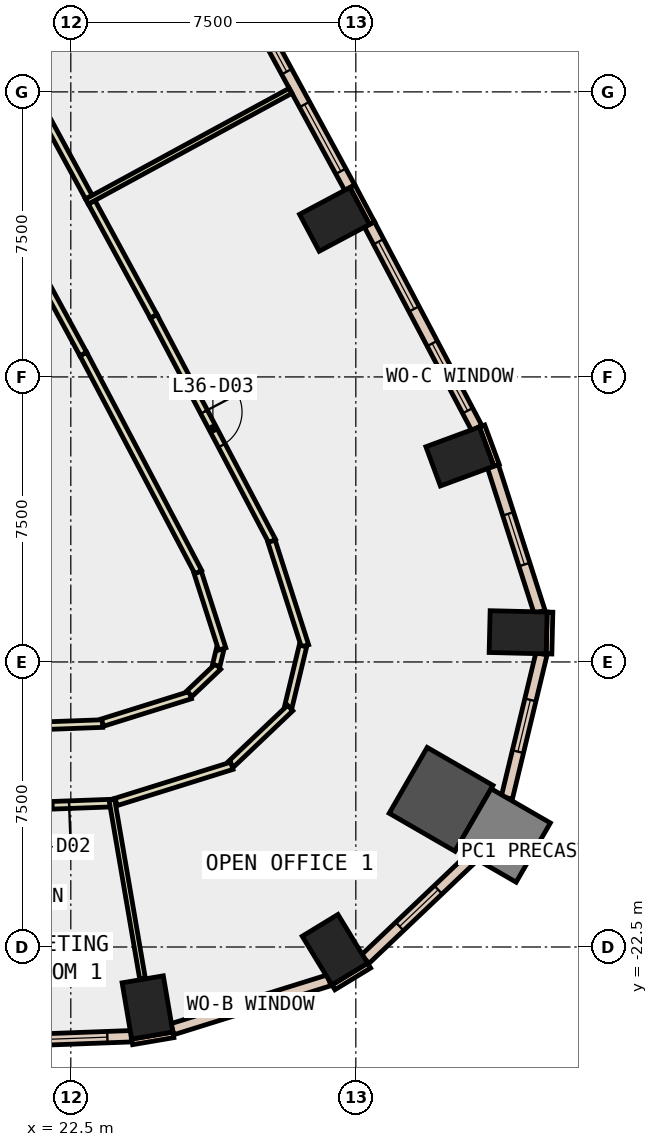
"""IFC4 building model, lengths in metres.
Left out: names, types, materials, properties, quantities, classifications, styles, units other than length and angle.
Written with IfcOpenShell. Run it as: python <this file> out.ifc"""

import sys

from ifc_helpers import new_model, si_unit, direction, frame, frame_2d, origin, origin_2d, place, context, subcontext, project, spatial, rectangle, extrude, element, fill, save


model = new_model("IFC4")
c1 = context("Model", 3, precision=1e-05, world=origin(), true_north=direction((0.0, 1.0)))
c2 = subcontext(c1, "Body", "Model", "MODEL_VIEW")
j1 = project(units=[si_unit("LENGTHUNIT", "METRE"), si_unit("PLANEANGLEUNIT", "RADIAN")], contexts=[c1])
p1 = place(None, origin())
s1 = spatial("IfcSite", under=j1, at=p1, CompositionType="ELEMENT")
p2 = place(p1, origin())
s2 = spatial("IfcBuilding", under=s1, at=p2, CompositionType="ELEMENT")
p3 = place(p2, frame((0.0, 0.0, 163.4)))
s3 = spatial("IfcBuildingStorey", under=s2, at=p3, CompositionType="ELEMENT", Elevation=163.4)
for number, where, z_axis, x_axis in (
    (1, (24.518, -24.09, -0.4), (0.0, 0.0, 1.0), (0.986, 0.168, 0.0)),
    (2, (29.45, -22.571, -0.4), (0.0, 0.0, 1.0), (0.854, 0.521, 0.0)),
):
    element("IfcColumn", number, at=place(p3, frame(where, z_axis=z_axis, x_axis=x_axis)), inside=s3, PredefinedType="COLUMN", context=c2, shape_type="SweptSolid", body=[
        extrude(rectangle(XDim=1.1, YDim=1.5, at=origin_2d()), origin(), (0.0, 0.0, 1.0), 4.2),
    ])
p4 = place(p3, frame((32.244, -18.615, -0.4), z_axis=(0.0, 0.0, 1.0), x_axis=(-0.866025403784, 0.5, 0.0)))
e3 = element("IfcColumn", 3, at=p4, inside=s3, PredefinedType="COLUMN", context=c2, shape_type="SweptSolid", body=[
    extrude(rectangle(XDim=2.0, YDim=2.0, at=origin_2d()), origin(), (0.0, 0.0, 1.0), 4.2),
])
for number, where, z_axis, x_axis in (
    (4, (34.271, -14.219, -0.4), (0.0, 0.0, 1.0), (0.024, 1.0, 0.0)),
    (5, (32.738, -9.593, -0.4), (0.0, 0.0, 1.0), (-0.347, 0.938, 0.0)),
    (6, (29.44, -3.355, -0.4), (0.0, 0.0, 1.0), (-0.47, 0.883, 0.0)),
):
    element("IfcColumn", number, at=place(p3, frame(where, z_axis=z_axis, x_axis=x_axis)), inside=s3, PredefinedType="COLUMN", context=c2, shape_type="SweptSolid", body=[
        extrude(rectangle(XDim=1.1, YDim=1.5, at=origin_2d()), origin(), (0.0, 0.0, 1.0), 4.2),
    ])
p5 = place(p3, frame((33.889, -19.565, -0.4), z_axis=(0.0, 0.0, 1.0), x_axis=(-0.866025403784, 0.5, 0.0)))
e7 = element("IfcColumn", 7, at=p5, inside=s3, PredefinedType="COLUMN", context=c2, shape_type="SweptSolid", body=[
    extrude(rectangle(XDim=1.8, YDim=1.8, at=origin_2d()), origin(), (0.0, 0.0, 1.0), 4.2),
])
for number, where, z_axis, x_axis in (
    (8, (33.702, -9.823, 0.0), (0.0, 0.0, 1.0), (-0.346, 0.938, 0.0)),
    (9, (30.426, -3.453, 0.0), (0.0, 0.0, 1.0), (-0.47, 0.883, 0.0)),
):
    element("IfcWall", number, at=place(p3, frame(where, z_axis=z_axis, x_axis=x_axis)), inside=s3, PredefinedType="STANDARD", context=c2, shape_type="SweptSolid", body=[
        extrude(rectangle(XDim=1.1, YDim=0.15, at=frame_2d((0.55, 0.0))), origin(), (0.0, 0.0, 1.0), 3.8),
    ])
p6 = place(p3, frame((24.114, -24.996, 0.0), z_axis=(0.0, 0.0, 1.0), x_axis=(0.985763338892, 0.168138751323, 0.0)))
e10 = element("IfcWall", 10, at=p6, inside=s3, PredefinedType="STANDARD", context=c2, shape_type="SweptSolid", body=[
    extrude(rectangle(XDim=1.101, YDim=0.15, at=frame_2d((0.55, 0.0))), origin(), (0.0, 0.0, 1.0), 3.8),
])
p7 = place(p3, frame((29.41, -23.561, 0.0), z_axis=(0.0, 0.0, 1.0), x_axis=(0.854065628997, 0.520165263514, 0.0)))
e11 = element("IfcWall", 11, at=p7, inside=s3, PredefinedType="STANDARD", context=c2, shape_type="SweptSolid", body=[
    extrude(rectangle(XDim=1.1, YDim=0.15, at=frame_2d((0.55, 0.0))), origin(), (0.0, 0.0, 1.0), 3.8),
])
p8 = place(p3, frame((35.083, -14.789, 0.0), z_axis=(0.0, 0.0, 1.0), x_axis=(0.023517683673, 0.999723421029, 0.0)))
e12 = element("IfcWall", 12, at=p8, inside=s3, PredefinedType="STANDARD", context=c2, shape_type="SweptSolid", body=[
    extrude(rectangle(XDim=1.1, YDim=0.15, at=frame_2d((0.55, 0.0))), origin(), (0.0, 0.0, 1.0), 3.8),
])
p9 = place(p3, frame((16.778, -25.12, 0.0), z_axis=(0.0, 0.0, 1.0), x_axis=(0.999307730926, 0.037202942236, 0.0)))
e13 = element("IfcWall", 13, at=p9, inside=s3, PredefinedType="STANDARD", context=c2, shape_type="SweptSolid", body=[
    extrude(rectangle(XDim=7.317, YDim=0.3, at=frame_2d((3.659, 0.0))), origin(), (0.0, 0.0, 1.0), 3.8),
])
p10 = place(p9, frame((0.629, 0.0, 0.9)))
e14 = element("IfcOpeningElement", 14, at=p10, cuts=e13, PredefinedType="OPENING", context=c2, shape_type="SweptSolid", body=[
    extrude(rectangle(XDim=2.4, YDim=2.6, at=frame_2d((1.2, 1.3))), frame((0.0, 0.16, 0.0), z_axis=(0.0, -1.0, 0.0), x_axis=(1.0, 0.0, 0.0)), (0.0, 0.0, 1.0), 0.32),
])
p11 = place(p9, frame((4.288, 0.0, 0.9)))
e15 = element("IfcOpeningElement", 15, at=p11, cuts=e13, PredefinedType="OPENING", context=c2, shape_type="SweptSolid", body=[
    extrude(rectangle(XDim=2.4, YDim=2.6, at=frame_2d((1.2, 1.3))), frame((0.0, 0.16, 0.0), z_axis=(0.0, -1.0, 0.0), x_axis=(1.0, 0.0, 0.0)), (0.0, 0.0, 1.0), 0.32),
])
p12 = place(p3, frame((25.172, -24.663, 0.0), z_axis=(0.0, 0.0, 1.0), x_axis=(0.954628614874, 0.29779893832, 0.0)))
e16 = element("IfcWall", 16, at=p12, inside=s3, PredefinedType="STANDARD", context=c2, shape_type="SweptSolid", body=[
    extrude(rectangle(XDim=4.322, YDim=0.3, at=frame_2d((2.161, 0.0))), origin(), (0.0, 0.0, 1.0), 3.8),
])
p13 = place(p12, frame((1.461, 0.0, 0.9)))
e17 = element("IfcOpeningElement", 17, at=p13, cuts=e16, PredefinedType="OPENING", context=c2, shape_type="SweptSolid", body=[
    extrude(rectangle(XDim=1.4, YDim=2.6, at=frame_2d((0.7, 1.3))), frame((0.0, 0.16, 0.0), z_axis=(0.0, -1.0, 0.0), x_axis=(1.0, 0.0, 0.0)), (0.0, 0.0, 1.0), 0.32),
])
p14 = place(p3, frame((30.246, -22.821, 0.0), z_axis=(0.0, 0.0, 1.0), x_axis=(0.724807239831, 0.688951714628, 0.0)))
e18 = element("IfcWall", 18, at=p14, inside=s3, PredefinedType="STANDARD", context=c2, shape_type="SweptSolid", body=[
    extrude(rectangle(XDim=3.902, YDim=0.3, at=frame_2d((1.951, 0.0))), origin(), (0.0, 0.0, 1.0), 3.8),
])
p15 = place(p14, frame((1.251, 0.0, 0.9)))
e19 = element("IfcOpeningElement", 19, at=p15, cuts=e18, PredefinedType="OPENING", context=c2, shape_type="SweptSolid", body=[
    extrude(rectangle(XDim=1.4, YDim=2.6, at=frame_2d((0.7, 1.3))), frame((0.0, 0.16, 0.0), z_axis=(0.0, -1.0, 0.0), x_axis=(1.0, 0.0, 0.0)), (0.0, 0.0, 1.0), 0.32),
])
p16 = place(p3, frame((33.973, -18.575, 0.0), z_axis=(0.0, 0.0, 1.0), x_axis=(0.234102046927, 0.972212030179, 0.0)))
e20 = element("IfcWall", 20, at=p16, inside=s3, PredefinedType="STANDARD", context=c2, shape_type="SweptSolid", body=[
    extrude(rectangle(XDim=3.9, YDim=0.3, at=frame_2d((1.95, 0.0))), origin(), (0.0, 0.0, 1.0), 3.8),
])
p17 = place(p16, frame((1.25, 0.0, 0.9)))
e21 = element("IfcOpeningElement", 21, at=p17, cuts=e20, PredefinedType="OPENING", context=c2, shape_type="SweptSolid", body=[
    extrude(rectangle(XDim=1.4, YDim=2.6, at=frame_2d((0.7, 1.3))), frame((0.0, 0.16, 0.0), z_axis=(0.0, -1.0, 0.0), x_axis=(1.0, 0.0, 0.0)), (0.0, 0.0, 1.0), 0.32),
])
p18 = place(p3, frame((34.835, -13.684, 0.0), z_axis=(0.0, 0.0, 1.0), x_axis=(-0.305018133869, 0.952346543025, 0.0)))
e22 = element("IfcWall", 22, at=p18, inside=s3, PredefinedType="STANDARD", context=c2, shape_type="SweptSolid", body=[
    extrude(rectangle(XDim=4.02, YDim=0.3, at=frame_2d((2.01, 0.0))), origin(), (0.0, 0.0, 1.0), 3.8),
])
p19 = place(p18, frame((1.31, 0.0, 0.9)))
e23 = element("IfcOpeningElement", 23, at=p19, cuts=e22, PredefinedType="OPENING", context=c2, shape_type="SweptSolid", body=[
    extrude(rectangle(XDim=1.4, YDim=2.6, at=frame_2d((0.7, 1.3))), frame((0.0, 0.16, 0.0), z_axis=(0.0, -1.0, 0.0), x_axis=(1.0, 0.0, 0.0)), (0.0, 0.0, 1.0), 0.32),
])
p20 = place(p3, frame((33.182, -8.844, 0.0), z_axis=(0.0, 0.0, 1.0), x_axis=(-0.466399410196, 0.884574242316, 0.0)))
e24 = element("IfcWall", 24, at=p20, inside=s3, PredefinedType="STANDARD", context=c2, shape_type="SweptSolid", body=[
    extrude(rectangle(XDim=6.055, YDim=0.3, at=frame_2d((3.027, 0.0))), origin(), (0.0, 0.0, 1.0), 3.8),
])
p21 = place(p20, frame((0.514, 0.0, 0.9)))
e25 = element("IfcOpeningElement", 25, at=p21, cuts=e24, PredefinedType="OPENING", context=c2, shape_type="SweptSolid", body=[
    extrude(rectangle(XDim=2.0, YDim=2.6, at=frame_2d((1.0, 1.3))), frame((0.0, 0.16, 0.0), z_axis=(0.0, -1.0, 0.0), x_axis=(1.0, 0.0, 0.0)), (0.0, 0.0, 1.0), 0.32),
])
p22 = place(p20, frame((3.541, 0.0, 0.9)))
e26 = element("IfcOpeningElement", 26, at=p22, cuts=e24, PredefinedType="OPENING", context=c2, shape_type="SweptSolid", body=[
    extrude(rectangle(XDim=2.0, YDim=2.6, at=frame_2d((1.0, 1.3))), frame((0.0, 0.16, 0.0), z_axis=(0.0, -1.0, 0.0), x_axis=(1.0, 0.0, 0.0)), (0.0, 0.0, 1.0), 0.32),
])
p23 = place(p3, frame((29.839, -2.52, 0.0), z_axis=(0.0, 0.0, 1.0), x_axis=(-0.477555226268, 0.878601733361, 0.0)))
e27 = element("IfcWall", 27, at=p23, inside=s3, PredefinedType="STANDARD", context=c2, shape_type="SweptSolid", body=[
    extrude(rectangle(XDim=5.964, YDim=0.3, at=frame_2d((2.982, 0.0))), origin(), (0.0, 0.0, 1.0), 3.8),
])
p24 = place(p23, frame((0.491, 0.0, 0.9)))
e28 = element("IfcOpeningElement", 28, at=p24, cuts=e27, PredefinedType="OPENING", context=c2, shape_type="SweptSolid", body=[
    extrude(rectangle(XDim=2.0, YDim=2.6, at=frame_2d((1.0, 1.3))), frame((0.0, 0.16, 0.0), z_axis=(0.0, -1.0, 0.0), x_axis=(1.0, 0.0, 0.0)), (0.0, 0.0, 1.0), 0.32),
])
p25 = place(p23, frame((3.473, 0.0, 0.9)))
e29 = element("IfcOpeningElement", 29, at=p25, cuts=e27, PredefinedType="OPENING", context=c2, shape_type="SweptSolid", body=[
    extrude(rectangle(XDim=2.0, YDim=2.6, at=frame_2d((1.0, 1.3))), frame((0.0, 0.16, 0.0), z_axis=(0.0, -1.0, 0.0), x_axis=(1.0, 0.0, 0.0)), (0.0, 0.0, 1.0), 0.32),
])
p26 = place(p3, frame((15.987, -16.893, 0.0), z_axis=(0.0, 0.0, 1.0), x_axis=(0.999316060953, 0.036978511606, 0.0)))
e30 = element("IfcWall", 30, at=p26, inside=s3, PredefinedType="PARTITIONING", context=c2, shape_type="SweptSolid", body=[
    extrude(rectangle(XDim=7.355, YDim=0.2, at=frame_2d((3.677, 0.0))), origin(), (0.0, 0.0, 1.0), 3.8),
])
p27 = place(p3, frame((23.333, -16.595, 0.0), z_axis=(0.0, 0.0, 1.0), x_axis=(0.95454810771, 0.298056890655, 0.0)))
e31 = element("IfcWall", 31, at=p27, inside=s3, PredefinedType="PARTITIONING", context=c2, shape_type="SweptSolid", body=[
    extrude(rectangle(XDim=2.422, YDim=0.2, at=frame_2d((1.211, 0.0))), origin(), (0.0, 0.0, 1.0), 3.8),
])
p28 = place(p3, frame((25.622, -15.834, 0.0), z_axis=(0.0, 0.0, 1.0), x_axis=(0.725069777966, 0.688675407634, 0.0)))
e32 = element("IfcWall", 32, at=p28, inside=s3, PredefinedType="PARTITIONING", context=c2, shape_type="SweptSolid", body=[
    extrude(rectangle(XDim=1.04, YDim=0.2, at=frame_2d((0.52, 0.0))), origin(), (0.0, 0.0, 1.0), 3.8),
])
p29 = place(p3, frame((26.327, -15.089, 0.0), z_axis=(0.0, 0.0, 1.0), x_axis=(0.233414791565, 0.972377259647, 0.0)))
e33 = element("IfcWall", 33, at=p29, inside=s3, PredefinedType="PARTITIONING", context=c2, shape_type="SweptSolid", body=[
    extrude(rectangle(XDim=0.441, YDim=0.2, at=frame_2d((0.221, 0.0))), origin(), (0.0, 0.0, 1.0), 3.8),
])
p30 = place(p3, frame((26.484, -14.658, 0.0), z_axis=(0.0, 0.0, 1.0), x_axis=(-0.305169069368, 0.952298188122, 0.0)))
e34 = element("IfcWall", 34, at=p30, inside=s3, PredefinedType="PARTITIONING", context=c2, shape_type="SweptSolid", body=[
    extrude(rectangle(XDim=2.117, YDim=0.2, at=frame_2d((1.059, 0.0))), origin(), (0.0, 0.0, 1.0), 3.8),
])
p31 = place(p3, frame((25.854, -12.635, 0.0), z_axis=(0.0, 0.0, 1.0), x_axis=(-0.466483047656, 0.884530138689, 0.0)))
e35 = element("IfcWall", 35, at=p31, inside=s3, PredefinedType="PARTITIONING", context=c2, shape_type="SweptSolid", body=[
    extrude(rectangle(XDim=6.487, YDim=0.2, at=frame_2d((3.244, 0.0))), origin(), (0.0, 0.0, 1.0), 3.8),
])
p32 = place(p3, frame((22.828, -6.897, 0.0), z_axis=(0.0, 0.0, 1.0), x_axis=(-0.477513909405, 0.878624189472, 0.0)))
e36 = element("IfcWall", 36, at=p32, inside=s3, PredefinedType="PARTITIONING", context=c2, shape_type="SweptSolid", body=[
    extrude(rectangle(XDim=6.956, YDim=0.2, at=frame_2d((3.478, 0.0))), origin(), (0.0, 0.0, 1.0), 3.8),
])
p33 = place(p3, frame((23.62, -18.712, 0.0), z_axis=(0.0, 0.0, 1.0), x_axis=(-0.999316841287, -0.03695741767, 0.0)))
e37 = element("IfcWall", 37, at=p33, inside=s3, PredefinedType="PARTITIONING", context=c2, shape_type="SweptSolid", body=[
    extrude(rectangle(XDim=3.329, YDim=0.2, at=frame_2d((1.665, 0.0))), origin(), (0.0, 0.0, 1.0), 3.8),
])
p34 = place(p33, frame((1.165, 0.0, 0.0)))
e38 = element("IfcOpeningElement", 38, at=p34, cuts=e37, PredefinedType="OPENING", context=c2, shape_type="SweptSolid", body=[
    extrude(rectangle(XDim=1.0, YDim=2.1, at=frame_2d((0.5, 1.05))), frame((0.0, 0.11, 0.0), z_axis=(0.0, -1.0, 0.0), x_axis=(1.0, 0.0, 0.0)), (0.0, 0.0, 1.0), 0.22),
])
p35 = place(p3, frame((23.048, -2.903, 0.0), z_axis=(0.0, 0.0, 1.0), x_axis=(0.477470161865, -0.878647963936, 0.0)))
e39 = element("IfcWall", 39, at=p35, inside=s3, PredefinedType="PARTITIONING", context=c2, shape_type="SweptSolid", body=[
    extrude(rectangle(XDim=3.418, YDim=0.2, at=frame_2d((1.709, 0.0))), origin(), (0.0, 0.0, 1.0), 3.8),
])
p36 = place(p3, frame((24.68, -5.906, 0.0), z_axis=(0.0, 0.0, 1.0), x_axis=(0.466450727507, -0.884547182918, 0.0)))
e40 = element("IfcWall", 40, at=p36, inside=s3, PredefinedType="PARTITIONING", context=c2, shape_type="SweptSolid", body=[
    extrude(rectangle(XDim=6.685, YDim=0.2, at=frame_2d((3.342, 0.0))), origin(), (0.0, 0.0, 1.0), 3.8),
])
p37 = place(p36, frame((2.842, 0.0, 0.0)))
e41 = element("IfcOpeningElement", 41, at=p37, cuts=e40, PredefinedType="OPENING", context=c2, shape_type="SweptSolid", body=[
    extrude(rectangle(XDim=1.0, YDim=2.1, at=frame_2d((0.5, 1.05))), frame((0.0, 0.11, 0.0), z_axis=(0.0, -1.0, 0.0), x_axis=(1.0, 0.0, 0.0)), (0.0, 0.0, 1.0), 0.22),
])
p38 = place(p3, frame((27.782, -11.825, 0.0), z_axis=(0.0, 0.0, 1.0), x_axis=(0.304925942137, -0.952376065329, 0.0)))
e42 = element("IfcWall", 42, at=p38, inside=s3, PredefinedType="PARTITIONING", context=c2, shape_type="SweptSolid", body=[
    extrude(rectangle(XDim=2.89, YDim=0.2, at=frame_2d((1.445, 0.0))), origin(), (0.0, 0.0, 1.0), 3.8),
])
p39 = place(p3, frame((28.609, -14.579, 0.0), z_axis=(0.0, 0.0, 1.0), x_axis=(-0.233826017197, -0.972278454807, 0.0)))
e43 = element("IfcWall", 43, at=p39, inside=s3, PredefinedType="PARTITIONING", context=c2, shape_type="SweptSolid", body=[
    extrude(rectangle(XDim=1.651, YDim=0.2, at=frame_2d((0.825, 0.0))), origin(), (0.0, 0.0, 1.0), 3.8),
])
p40 = place(p3, frame((28.272, -16.212, 0.0), z_axis=(0.0, 0.0, 1.0), x_axis=(-0.724712974479, -0.689050872303, 0.0)))
e44 = element("IfcWall", 44, at=p40, inside=s3, PredefinedType="PARTITIONING", context=c2, shape_type="SweptSolid", body=[
    extrude(rectangle(XDim=2.15, YDim=0.2, at=frame_2d((1.075, 0.0))), origin(), (0.0, 0.0, 1.0), 3.8),
])
p41 = place(p3, frame((26.737, -17.732, 0.0), z_axis=(0.0, 0.0, 1.0), x_axis=(-0.954546657381, -0.298061535398, 0.0)))
e45 = element("IfcWall", 45, at=p41, inside=s3, PredefinedType="PARTITIONING", context=c2, shape_type="SweptSolid", body=[
    extrude(rectangle(XDim=3.191, YDim=0.2, at=frame_2d((1.596, 0.0))), origin(), (0.0, 0.0, 1.0), 3.8),
])
p42 = place(p3, frame((21.345, 0.23, 0.0), z_axis=(0.0, 0.0, 1.0), x_axis=(0.477544508622, -0.878607558746, 0.0)))
e46 = element("IfcWall", 46, at=p42, inside=s3, PredefinedType="PARTITIONING", context=c2, shape_type="SweptSolid", body=[
    extrude(rectangle(XDim=3.416, YDim=0.2, at=frame_2d((1.708, 0.0))), origin(), (0.0, 0.0, 1.0), 3.8),
])
p43 = place(p3, frame((23.578, -18.614, 0.0), z_axis=(0.0, 0.0, 1.0), x_axis=(0.169054430835, -0.985606716401, 0.0)))
e47 = element("IfcWall", 47, at=p43, inside=s3, PredefinedType="PARTITIONING", context=c2, shape_type="SweptSolid", body=[
    extrude(rectangle(XDim=4.786, YDim=0.15, at=frame_2d((2.393, 0.0))), origin(), (0.0, 0.0, 1.0), 3.8),
])
p44 = place(p3, frame((22.924, -2.885, 0.0), z_axis=(0.0, 0.0, 1.0), x_axis=(0.878512782244, 0.477718841406, 0.0)))
e48 = element("IfcWall", 48, at=p44, inside=s3, PredefinedType="PARTITIONING", context=c2, shape_type="SweptSolid", body=[
    extrude(rectangle(XDim=6.1, YDim=0.15, at=frame_2d((3.05, 0.0))), origin(), (0.0, 0.0, 1.0), 3.8),
])
p45 = place(p11, origin())
e49 = element("IfcWindow", 49, at=p45, inside=s3, PartitioningType="SINGLE_PANEL", PredefinedType="WINDOW", context=c2, shape_type="SweptSolid", body=[
    extrude(rectangle(XDim=2.4, YDim=2.6, at=frame_2d((1.2, 1.3))), frame((0.0, 0.03, 0.0), z_axis=(0.0, -1.0, 0.0), x_axis=(1.0, 0.0, 0.0)), (0.0, 0.0, 1.0), 0.06),
])
fill(e15, e49)
p46 = place(p13, origin())
e50 = element("IfcWindow", 50, at=p46, inside=s3, PartitioningType="SINGLE_PANEL", PredefinedType="WINDOW", context=c2, shape_type="SweptSolid", body=[
    extrude(rectangle(XDim=1.4, YDim=2.6, at=frame_2d((0.7, 1.3))), frame((0.0, 0.03, 0.0), z_axis=(0.0, -1.0, 0.0), x_axis=(1.0, 0.0, 0.0)), (0.0, 0.0, 1.0), 0.06),
])
fill(e17, e50)
p47 = place(p15, origin())
e51 = element("IfcWindow", 51, at=p47, inside=s3, PartitioningType="SINGLE_PANEL", PredefinedType="WINDOW", context=c2, shape_type="SweptSolid", body=[
    extrude(rectangle(XDim=1.4, YDim=2.6, at=frame_2d((0.7, 1.3))), frame((0.0, 0.03, 0.0), z_axis=(0.0, -1.0, 0.0), x_axis=(1.0, 0.0, 0.0)), (0.0, 0.0, 1.0), 0.06),
])
fill(e19, e51)
p48 = place(p17, origin())
e52 = element("IfcWindow", 52, at=p48, inside=s3, PartitioningType="SINGLE_PANEL", PredefinedType="WINDOW", context=c2, shape_type="SweptSolid", body=[
    extrude(rectangle(XDim=1.4, YDim=2.6, at=frame_2d((0.7, 1.3))), frame((0.0, 0.03, 0.0), z_axis=(0.0, -1.0, 0.0), x_axis=(1.0, 0.0, 0.0)), (0.0, 0.0, 1.0), 0.06),
])
fill(e21, e52)
p49 = place(p19, origin())
e53 = element("IfcWindow", 53, at=p49, inside=s3, PartitioningType="SINGLE_PANEL", PredefinedType="WINDOW", context=c2, shape_type="SweptSolid", body=[
    extrude(rectangle(XDim=1.4, YDim=2.6, at=frame_2d((0.7, 1.3))), frame((0.0, 0.03, 0.0), z_axis=(0.0, -1.0, 0.0), x_axis=(1.0, 0.0, 0.0)), (0.0, 0.0, 1.0), 0.06),
])
fill(e23, e53)
p50 = place(p21, origin())
e54 = element("IfcWindow", 54, at=p50, inside=s3, PartitioningType="SINGLE_PANEL", PredefinedType="WINDOW", context=c2, shape_type="SweptSolid", body=[
    extrude(rectangle(XDim=2.0, YDim=2.6, at=frame_2d((1.0, 1.3))), frame((0.0, 0.03, 0.0), z_axis=(0.0, -1.0, 0.0), x_axis=(1.0, 0.0, 0.0)), (0.0, 0.0, 1.0), 0.06),
])
fill(e25, e54)
p51 = place(p22, origin())
e55 = element("IfcWindow", 55, at=p51, inside=s3, PartitioningType="SINGLE_PANEL", PredefinedType="WINDOW", context=c2, shape_type="SweptSolid", body=[
    extrude(rectangle(XDim=2.0, YDim=2.6, at=frame_2d((1.0, 1.3))), frame((0.0, 0.03, 0.0), z_axis=(0.0, -1.0, 0.0), x_axis=(1.0, 0.0, 0.0)), (0.0, 0.0, 1.0), 0.06),
])
fill(e26, e55)
p52 = place(p24, origin())
e56 = element("IfcWindow", 56, at=p52, inside=s3, PartitioningType="SINGLE_PANEL", PredefinedType="WINDOW", context=c2, shape_type="SweptSolid", body=[
    extrude(rectangle(XDim=2.0, YDim=2.6, at=frame_2d((1.0, 1.3))), frame((0.0, 0.03, 0.0), z_axis=(0.0, -1.0, 0.0), x_axis=(1.0, 0.0, 0.0)), (0.0, 0.0, 1.0), 0.06),
])
fill(e28, e56)
p53 = place(p25, origin())
e57 = element("IfcWindow", 57, at=p53, inside=s3, PartitioningType="SINGLE_PANEL", PredefinedType="WINDOW", context=c2, shape_type="SweptSolid", body=[
    extrude(rectangle(XDim=2.0, YDim=2.6, at=frame_2d((1.0, 1.3))), frame((0.0, 0.03, 0.0), z_axis=(0.0, -1.0, 0.0), x_axis=(1.0, 0.0, 0.0)), (0.0, 0.0, 1.0), 0.06),
])
fill(e29, e57)
p54 = place(p34, origin())
e58 = element("IfcDoor", 58, at=p54, inside=s3, OperationType="SINGLE_SWING_LEFT", PredefinedType="DOOR", context=c2, shape_type="SweptSolid", body=[
    extrude(rectangle(XDim=1.0, YDim=2.1, at=frame_2d((0.5, 1.05))), frame((0.0, 0.025, 0.0), z_axis=(0.0, -1.0, 0.0), x_axis=(1.0, 0.0, 0.0)), (0.0, 0.0, 1.0), 0.05),
])
fill(e38, e58)
p55 = place(p37, origin())
e59 = element("IfcDoor", 59, at=p55, inside=s3, OperationType="SINGLE_SWING_LEFT", PredefinedType="DOOR", context=c2, shape_type="SweptSolid", body=[
    extrude(rectangle(XDim=1.0, YDim=2.1, at=frame_2d((0.5, 1.05))), frame((0.0, 0.025, 0.0), z_axis=(0.0, -1.0, 0.0), x_axis=(1.0, 0.0, 0.0)), (0.0, 0.0, 1.0), 0.05),
])
fill(e41, e59)
save(model, sys.argv[1])
